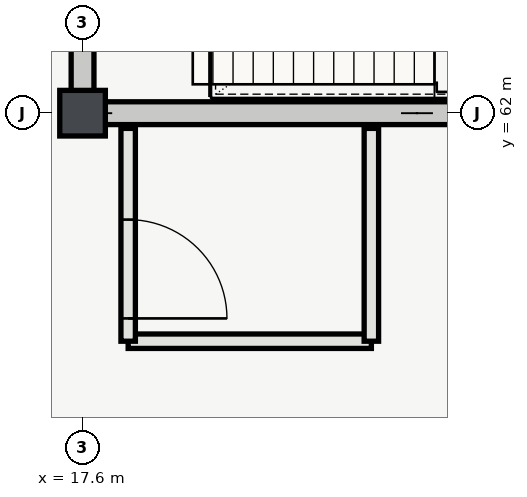
"""IFC4 building model, lengths in metres.
Left out: names, types, materials, properties, quantities, classifications, styles, units other than length and angle.
Written with IfcOpenShell. Run it as: python <this file> out.ifc"""

import sys

from ifc_helpers import new_model, si_unit, direction, frame, frame_2d, origin, origin_2d, place, context, subcontext, project, spatial, rectangle, extrude, element, fill, save


model = new_model("IFC4")
c1 = context("Model", 3, precision=1e-05, world=origin(), true_north=direction((0.0, 1.0)))
c2 = subcontext(c1, "Body", "Model", "MODEL_VIEW")
j1 = project(units=[si_unit("LENGTHUNIT", "METRE"), si_unit("PLANEANGLEUNIT", "RADIAN")], contexts=[c1])
p1 = place(None, origin())
s1 = spatial("IfcSite", under=j1, at=p1, CompositionType="ELEMENT")
p2 = place(p1, origin())
s2 = spatial("IfcBuilding", under=s1, at=p2, CompositionType="ELEMENT")
p3 = place(p2, frame((0.0, 0.0, 20.4)))
s3 = spatial("IfcBuildingStorey", under=s2, at=p3, CompositionType="ELEMENT", Elevation=20.4)
p4 = place(p3, frame((17.6, 62.0, 0.0), z_axis=(0.0, 0.0, 1.0), x_axis=(1.0, 0.0, 0.0)))
e1 = element("IfcColumn", 1, at=p4, inside=s3, PredefinedType="COLUMN", context=c2, shape_type="SweptSolid", body=[
    extrude(rectangle(XDim=0.6, YDim=0.6, at=origin_2d()), origin(), (0.0, 0.0, 1.0), 4.2),
])
p5 = place(p3, frame((17.45, 62.0, 0.0), z_axis=(0.0, 0.0, 1.0), x_axis=(1.0, 0.0, 0.0)))
e2 = element("IfcWall", 2, at=p5, inside=s3, PredefinedType="SHEAR", context=c2, shape_type="SweptSolid", body=[
    extrude(rectangle(XDim=9.1, YDim=0.3, at=frame_2d((4.55, 0.0))), origin(), (0.0, 0.0, 1.0), 3.92),
])
p6 = place(p3, frame((17.6, 62.15, 0.0), z_axis=(0.0, 0.0, 1.0), x_axis=(0.0, 1.0, 0.0)))
e3 = element("IfcWall", 3, at=p6, inside=s3, PredefinedType="SHEAR", context=c2, shape_type="SweptSolid", body=[
    extrude(rectangle(XDim=7.7, YDim=0.3, at=frame_2d((3.85, 0.0))), origin(), (0.0, 0.0, 1.0), 3.92),
])
p7 = place(p6, frame((1.65, 0.0, 0.0)))
e4 = element("IfcOpeningElement", 4, at=p7, cuts=e3, PredefinedType="OPENING", context=c2, shape_type="SweptSolid", body=[
    extrude(rectangle(XDim=1.4, YDim=2.2, at=frame_2d((0.7, 1.1))), frame((0.0, 0.16, 0.0), z_axis=(0.0, -1.0, 0.0), x_axis=(1.0, 0.0, 0.0)), (0.0, 0.0, 1.0), 0.32),
])
p8 = place(p6, frame((5.7, 0.0, 0.0)))
e5 = element("IfcOpeningElement", 5, at=p8, cuts=e3, PredefinedType="OPENING", context=c2, shape_type="SweptSolid", body=[
    extrude(rectangle(XDim=1.0, YDim=2.15, at=frame_2d((0.5, 1.075))), frame((0.0, 0.16, 0.0), z_axis=(0.0, -1.0, 0.0), x_axis=(1.0, 0.0, 0.0)), (0.0, 0.0, 1.0), 0.32),
])
p9 = place(p3, frame((18.2, 59.0, 0.0), z_axis=(0.0, 0.0, 1.0), x_axis=(1.0, 0.0, 0.0)))
e6 = element("IfcWall", 6, at=p9, inside=s3, PredefinedType="PARTITIONING", context=c2, shape_type="SweptSolid", body=[
    extrude(rectangle(XDim=3.2, YDim=0.19, at=frame_2d((1.6, 0.0))), origin(), (0.0, 0.0, 1.0), 3.92),
])
p10 = place(p3, frame((18.2, 61.8, 0.0), z_axis=(0.0, 0.0, 1.0), x_axis=(0.0, -1.0, 0.0)))
e7 = element("IfcWall", 7, at=p10, inside=s3, PredefinedType="PARTITIONING", context=c2, shape_type="SweptSolid", body=[
    extrude(rectangle(XDim=2.8, YDim=0.19, at=frame_2d((1.4, 0.0))), origin(), (0.0, 0.0, 1.0), 3.92),
])
p11 = place(p10, frame((1.2, 0.0, 0.0)))
e8 = element("IfcOpeningElement", 8, at=p11, cuts=e7, PredefinedType="OPENING", context=c2, shape_type="SweptSolid", body=[
    extrude(rectangle(XDim=1.3, YDim=2.2, at=frame_2d((0.65, 1.1))), frame((0.0, 0.105, 0.0), z_axis=(0.0, -1.0, 0.0), x_axis=(1.0, 0.0, 0.0)), (0.0, 0.0, 1.0), 0.21),
])
p12 = place(p3, frame((21.4, 59.0, 0.0), z_axis=(0.0, 0.0, 1.0), x_axis=(0.0, 1.0, 0.0)))
e9 = element("IfcWall", 9, at=p12, inside=s3, PredefinedType="PARTITIONING", context=c2, shape_type="SweptSolid", body=[
    extrude(rectangle(XDim=2.8, YDim=0.19, at=frame_2d((1.4, 0.0))), origin(), (0.0, 0.0, 1.0), 3.92),
])
p13 = place(p11, origin())
e10 = element("IfcDoor", 10, at=p13, inside=s3, OperationType="SINGLE_SWING_RIGHT", PredefinedType="DOOR", context=c2, shape_type="SweptSolid", body=[
    extrude(rectangle(XDim=1.3, YDim=2.2, at=frame_2d((0.65, 1.1))), frame((0.0, 0.025, 0.0), z_axis=(0.0, -1.0, 0.0), x_axis=(1.0, 0.0, 0.0)), (0.0, 0.0, 1.0), 0.05),
])
fill(e8, e10)
save(model, sys.argv[1])
